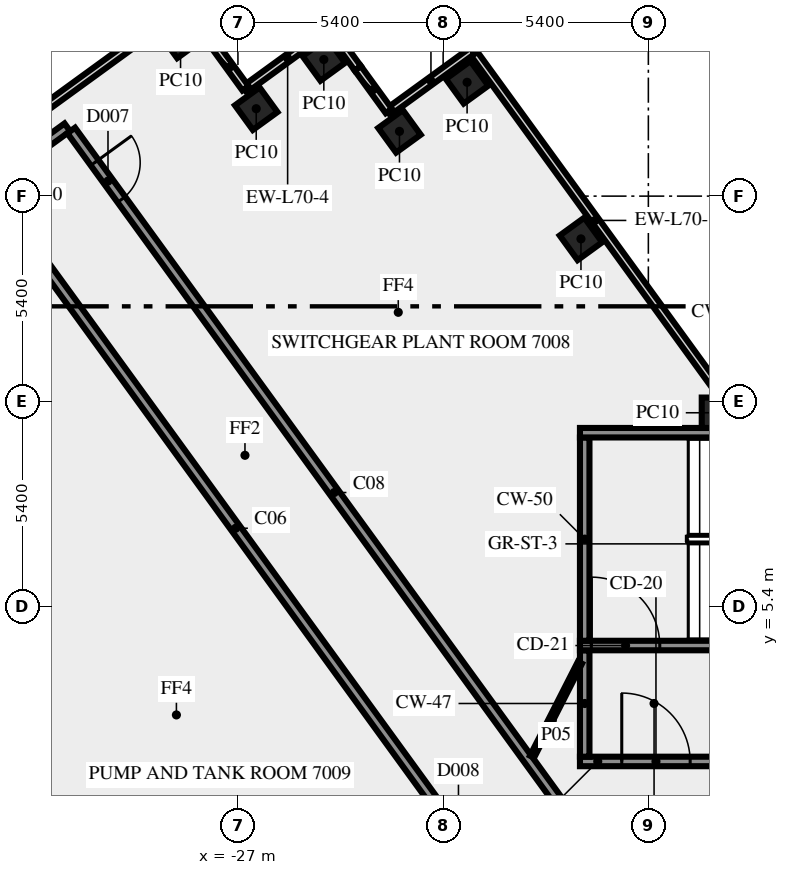
"""IFC4 building model, lengths in metres.
Left out: names, types, materials, properties, quantities, classifications, styles, units other than length and angle.
Written with IfcOpenShell. Run it as: python <this file> out.ifc"""

import sys

from ifc_helpers import new_model, si_unit, direction, frame, frame_2d, origin, origin_2d, place, context, subcontext, project, spatial, rectangle, extrude, element, fill, save


model = new_model("IFC4")
c1 = context("Model", 3, precision=1e-05, world=origin(), true_north=direction((0.0, 1.0)))
c2 = subcontext(c1, "Body", "Model", "MODEL_VIEW")
j1 = project(units=[si_unit("LENGTHUNIT", "METRE"), si_unit("PLANEANGLEUNIT", "RADIAN")], contexts=[c1])
p1 = place(None, origin())
s1 = spatial("IfcSite", under=j1, at=p1, CompositionType="ELEMENT")
p2 = place(p1, origin())
s2 = spatial("IfcBuilding", under=s1, at=p2, CompositionType="ELEMENT")
p3 = place(p2, frame((0.0, 0.0, 301.0)))
s3 = spatial("IfcBuildingStorey", under=s2, at=p3, CompositionType="ELEMENT", Elevation=301.0)
for number, where, z_axis, x_axis in (
    (1, (-17.974, 15.075, 0.0), (0.0, 0.0, 1.0), (-0.588, 0.809, 0.0)),
    (2, (-20.97, 19.195, 0.0), (0.0, 0.0, 1.0), (-0.588, 0.809, 0.0)),
    (3, (-22.749, 17.904, 0.0), (0.0, 0.0, 1.0), (-0.588, 0.809, 0.0)),
    (4, (-24.74, 19.795, 0.0), (0.0, 0.0, 1.0), (-0.588, 0.809, 0.0)),
    (5, (-26.519, 18.5, 0.0), (0.0, 0.0, 1.0), (-0.588, 0.809, 0.0)),
    (6, (-28.51, 20.39, 0.0), (0.0, 0.0, 1.0), (-0.809, -0.588, 0.0)),
    (7, (-14.395, 10.5, 0.0), (0.0, 0.0, 1.0), (-1.0, 0.0, 0.0)),
):
    element("IfcColumn", number, at=place(p3, frame(where, z_axis=z_axis, x_axis=x_axis)), inside=s3, PredefinedType="COLUMN", context=c2, shape_type="SweptSolid", body=[
        extrude(rectangle(XDim=0.8, YDim=0.8, at=origin_2d()), origin(), (0.0, 0.0, 1.0), 5.65),
    ])
p4 = place(p3, frame((-14.354, 11.093, 0.0), z_axis=(0.0, 0.0, 1.0), x_axis=(-0.58779571445, 0.809009393069, 0.0)))
e8 = element("IfcWall", 8, at=p4, inside=s3, PredefinedType="SOLIDWALL", context=c2, shape_type="SweptSolid", body=[
    extrude(rectangle(XDim=11.044, YDim=0.2, at=frame_2d((5.522, 0.0))), origin(), (0.0, 0.0, 1.0), 5.65),
])
p5 = place(p3, frame((-20.829, 20.025, 0.0), z_axis=(0.0, 0.0, 1.0), x_axis=(-0.808990163075, -0.587822180636, 0.0)))
e9 = element("IfcWall", 9, at=p5, inside=s3, PredefinedType="SOLIDWALL", context=c2, shape_type="SweptSolid", body=[
    extrude(rectangle(XDim=2.7, YDim=0.2, at=frame_2d((1.35, 0.0))), origin(), (0.0, 0.0, 1.0), 5.65),
])
p6 = place(p3, frame((-23.03, 18.441, 0.0), z_axis=(0.0, 0.0, 1.0), x_axis=(-0.587753586678, 0.809039999844, 0.0)))
e10 = element("IfcWall", 10, at=p6, inside=s3, PredefinedType="SOLIDWALL", context=c2, shape_type="SweptSolid", body=[
    extrude(rectangle(XDim=1.389, YDim=0.2, at=frame_2d((0.694, 0.0))), origin(), (0.0, 0.0, 1.0), 4.15),
])
p7 = place(p3, frame((-23.846, 19.565, 0.0), z_axis=(0.0, 0.0, 1.0), x_axis=(-0.587772972264, 0.809025916196, 0.0)))
e11 = element("IfcWall", 11, at=p7, inside=s3, PredefinedType="SOLIDWALL", context=c2, shape_type="SweptSolid", body=[
    extrude(rectangle(XDim=1.311, YDim=0.2, at=frame_2d((0.655, 0.0))), origin(), (0.0, 0.0, 1.0), 5.65),
])
p8 = place(p3, frame((-24.6, 20.623, 0.0), z_axis=(0.0, 0.0, 1.0), x_axis=(-0.809064397168, -0.587720002413, 0.0)))
e12 = element("IfcWall", 12, at=p8, inside=s3, PredefinedType="SOLIDWALL", context=c2, shape_type="SweptSolid", body=[
    extrude(rectangle(XDim=2.7, YDim=0.2, at=frame_2d((1.35, 0.0))), origin(), (0.0, 0.0, 1.0), 5.65),
])
p9 = place(p3, frame((-26.802, 19.038, 0.0), z_axis=(0.0, 0.0, 1.0), x_axis=(-0.587731903943, 0.809055751533, 0.0)))
e13 = element("IfcWall", 13, at=p9, inside=s3, PredefinedType="SOLIDWALL", context=c2, shape_type="SweptSolid", body=[
    extrude(rectangle(XDim=1.386, YDim=0.2, at=frame_2d((0.693, 0.0))), origin(), (0.0, 0.0, 1.0), 4.15),
])
p10 = place(p3, frame((-28.372, 21.22, 0.0), z_axis=(0.0, 0.0, 1.0), x_axis=(-0.809023074878, -0.587776883106, 0.0)))
e14 = element("IfcWall", 14, at=p10, inside=s3, PredefinedType="SOLIDWALL", context=c2, shape_type="SweptSolid", body=[
    extrude(rectangle(XDim=11.4, YDim=0.2, at=frame_2d((5.7, 0.0))), origin(), (0.0, 0.0, 1.0), 5.65),
])
p11 = place(p3, frame((-38.786, 6.993, 0.0), z_axis=(0.0, 0.0, 1.0), x_axis=(0.587789790223, -0.809013697356, 0.0)))
e15 = element("IfcWall", 15, at=p11, inside=s3, PredefinedType="SOLIDWALL", context=c2, shape_type="SweptSolid", body=[
    extrude(rectangle(XDim=16.956, YDim=0.2, at=frame_2d((8.478, 0.0))), origin(), (0.0, 0.0, 1.0), 5.65),
])
p12 = place(p3, frame((-18.0, 1.325, 0.0), z_axis=(0.0, 0.0, 1.0), x_axis=(1.0, 0.0, 0.0)))
e16 = element("IfcWall", 16, at=p12, inside=s3, PredefinedType="SHEAR", context=c2, shape_type="SweptSolid", body=[
    extrude(rectangle(XDim=3.9, YDim=0.25, at=frame_2d((1.95, 0.0))), origin(), (0.0, 0.0, 1.0), 5.65),
])
p13 = place(p12, frame((1.1, 0.0, 0.0)))
e17 = element("IfcOpeningElement", 17, at=p13, cuts=e16, PredefinedType="OPENING", context=c2, shape_type="SweptSolid", body=[
    extrude(rectangle(XDim=1.8, YDim=2.1, at=frame_2d((0.9, 1.05))), frame((0.0, 0.135, 0.0), z_axis=(0.0, -1.0, 0.0), x_axis=(1.0, 0.0, 0.0)), (0.0, 0.0, 1.0), 0.27),
])
p14 = place(p3, frame((-17.875, 1.45, 0.0), z_axis=(0.0, 0.0, 1.0), x_axis=(0.0, 1.0, 0.0)))
e18 = element("IfcWall", 18, at=p14, inside=s3, PredefinedType="SHEAR", context=c2, shape_type="SweptSolid", body=[
    extrude(rectangle(XDim=2.8, YDim=0.25, at=frame_2d((1.4, 0.0))), origin(), (0.0, 0.0, 1.0), 5.65),
])
p15 = place(p3, frame((-18.0, 4.375, 0.0), z_axis=(0.0, 0.0, 1.0), x_axis=(1.0, 0.0, 0.0)))
e19 = element("IfcWall", 19, at=p15, inside=s3, PredefinedType="SHEAR", context=c2, shape_type="SweptSolid", body=[
    extrude(rectangle(XDim=10.5, YDim=0.25, at=frame_2d((5.25, 0.0))), origin(), (0.0, 0.0, 1.0), 5.65),
])
p16 = place(p15, frame((0.3, 0.0, 0.0)))
e20 = element("IfcOpeningElement", 20, at=p16, cuts=e19, PredefinedType="OPENING", context=c2, shape_type="SweptSolid", body=[
    extrude(rectangle(XDim=1.8, YDim=2.1, at=frame_2d((0.9, 1.05))), frame((0.0, 0.135, 0.0), z_axis=(0.0, -1.0, 0.0), x_axis=(1.0, 0.0, 0.0)), (0.0, 0.0, 1.0), 0.27),
])
p17 = place(p3, frame((-17.875, 4.5, 0.0), z_axis=(0.0, 0.0, 1.0), x_axis=(0.0, 1.0, 0.0)))
e21 = element("IfcWall", 21, at=p17, inside=s3, PredefinedType="SHEAR", context=c2, shape_type="SweptSolid", body=[
    extrude(rectangle(XDim=5.35, YDim=0.25, at=frame_2d((2.675, 0.0))), origin(), (0.0, 0.0, 1.0), 5.65),
])
p18 = place(p3, frame((-18.0, 9.975, 0.0), z_axis=(0.0, 0.0, 1.0), x_axis=(1.0, 0.0, 0.0)))
e22 = element("IfcWall", 22, at=p18, inside=s3, PredefinedType="SHEAR", context=c2, shape_type="SweptSolid", body=[
    extrude(rectangle(XDim=10.5, YDim=0.25, at=frame_2d((5.25, 0.0))), origin(), (0.0, 0.0, 1.0), 5.65),
])
p19 = place(p18, frame((4.5, 0.0, 1.0)))
e23 = element("IfcOpeningElement", 23, at=p19, cuts=e22, PredefinedType="OPENING", context=c2, shape_type="SweptSolid", body=[
    extrude(rectangle(XDim=1.2, YDim=1.2, at=frame_2d((0.6, 0.6))), frame((0.0, 0.135, 0.0), z_axis=(0.0, -1.0, 0.0), x_axis=(1.0, 0.0, 0.0)), (0.0, 0.0, 1.0), 0.27),
])
p20 = place(p3, frame((-20.531, -1.523, 0.0), z_axis=(0.0, 0.0, 1.0), x_axis=(-0.587782114023, 0.809019274452, 0.0)))
e24 = element("IfcWall", 24, at=p20, inside=s3, PredefinedType="SOLIDWALL", context=c2, shape_type="SweptSolid", body=[
    extrude(rectangle(XDim=22.212, YDim=0.25, at=frame_2d((11.106, 0.0))), origin(), (0.0, 0.0, 1.0), 5.65),
])
p21 = place(p20, frame((0.533, 0.0, 0.0)))
e25 = element("IfcOpeningElement", 25, at=p21, cuts=e24, PredefinedType="OPENING", context=c2, shape_type="SweptSolid", body=[
    extrude(rectangle(XDim=1.2, YDim=2.1, at=frame_2d((0.6, 1.05))), frame((0.0, 0.135, 0.0), z_axis=(0.0, -1.0, 0.0), x_axis=(1.0, 0.0, 0.0)), (0.0, 0.0, 1.0), 0.27),
])
p22 = place(p3, frame((-33.502, 16.549, 0.0), z_axis=(0.0, 0.0, 1.0), x_axis=(0.809045768422, 0.587745646176, 0.0)))
e26 = element("IfcWall", 26, at=p22, inside=s3, PredefinedType="SOLIDWALL", context=c2, shape_type="SweptSolid", body=[
    extrude(rectangle(XDim=2.488, YDim=0.25, at=frame_2d((1.244, 0.0))), origin(), (0.0, 0.0, 1.0), 5.65),
])
p23 = place(p3, frame((-31.387, 17.927, 0.0), z_axis=(0.0, 0.0, 1.0), x_axis=(0.587788830132, -0.80901439491, 0.0)))
e27 = element("IfcWall", 27, at=p23, inside=s3, PredefinedType="SOLIDWALL", context=c2, shape_type="SweptSolid", body=[
    extrude(rectangle(XDim=23.549, YDim=0.25, at=frame_2d((11.775, 0.0))), origin(), (0.0, 0.0, 1.0), 5.65),
])
p24 = place(p23, frame((1.046, 0.0, 0.0)))
e28 = element("IfcOpeningElement", 28, at=p24, cuts=e27, PredefinedType="OPENING", context=c2, shape_type="SweptSolid", body=[
    extrude(rectangle(XDim=1.2, YDim=2.1, at=frame_2d((0.6, 1.05))), frame((0.0, 0.135, 0.0), z_axis=(0.0, -1.0, 0.0), x_axis=(1.0, 0.0, 0.0)), (0.0, 0.0, 1.0), 0.27),
])
p25 = place(p3, frame((-19.261, 1.45, 0.0), z_axis=(0.0, 0.0, 1.0), x_axis=(0.453950796792, 0.891026752736, 0.0)))
e29 = element("IfcWall", 29, at=p25, inside=s3, PredefinedType="PARTITIONING", context=c2, shape_type="SweptSolid", body=[
    extrude(rectangle(XDim=2.778, YDim=0.12, at=frame_2d((1.389, 0.0))), origin(), (0.0, 0.0, 1.0), 5.65),
])
p26 = place(p13, origin())
e30 = element("IfcDoor", 30, at=p26, inside=s3, OperationType="DOUBLE_DOOR_SINGLE_SWING", PredefinedType="DOOR", context=c2, shape_type="SweptSolid", body=[
    extrude(rectangle(XDim=1.8, YDim=2.1, at=frame_2d((0.9, 1.05))), frame((0.0, 0.025, 0.0), z_axis=(0.0, -1.0, 0.0), x_axis=(1.0, 0.0, 0.0)), (0.0, 0.0, 1.0), 0.05),
])
fill(e17, e30)
p27 = place(p16, origin())
e31 = element("IfcDoor", 31, at=p27, inside=s3, OperationType="DOUBLE_DOOR_SINGLE_SWING", PredefinedType="DOOR", context=c2, shape_type="SweptSolid", body=[
    extrude(rectangle(XDim=1.8, YDim=2.1, at=frame_2d((0.9, 1.05))), frame((0.0, 0.025, 0.0), z_axis=(0.0, -1.0, 0.0), x_axis=(1.0, 0.0, 0.0)), (0.0, 0.0, 1.0), 0.05),
])
fill(e20, e31)
p28 = place(p24, origin())
e32 = element("IfcDoor", 32, at=p28, inside=s3, OperationType="SINGLE_SWING_LEFT", PredefinedType="DOOR", context=c2, shape_type="SweptSolid", body=[
    extrude(rectangle(XDim=1.2, YDim=2.1, at=frame_2d((0.6, 1.05))), frame((0.0, 0.025, 0.0), z_axis=(0.0, -1.0, 0.0), x_axis=(1.0, 0.0, 0.0)), (0.0, 0.0, 1.0), 0.05),
])
fill(e28, e32)
save(model, sys.argv[1])
